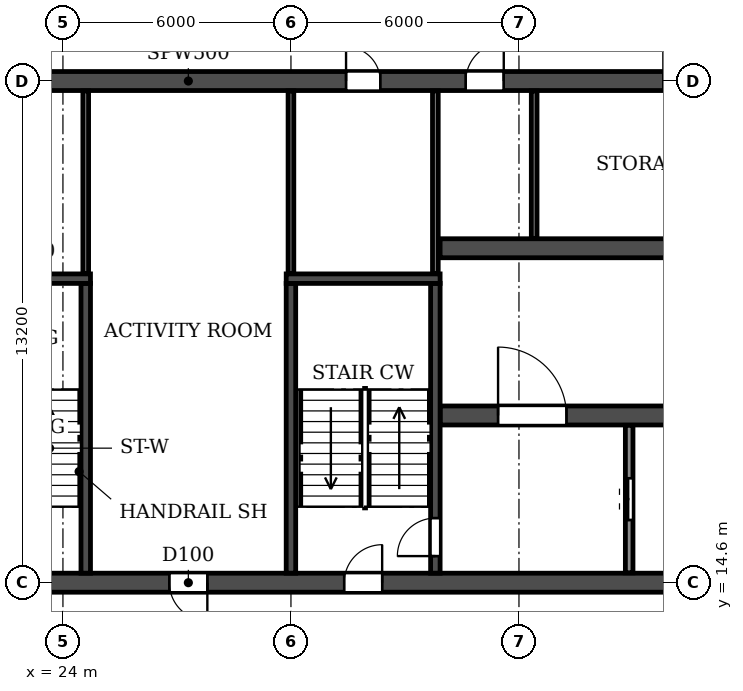
"""IFC4 building model, lengths in metres.
Left out: names, types, materials, properties, quantities, classifications, styles, units other than length and angle.
Written with IfcOpenShell. Run it as: python <this file> out.ifc"""

import sys

from ifc_helpers import new_model, si_unit, direction, frame, frame_2d, origin, place, context, subcontext, project, spatial, rectangle, extrude, element, fill, save


model = new_model("IFC4")
c1 = context("Model", 3, precision=1e-05, world=origin(), true_north=direction((0.0, 1.0)))
c2 = subcontext(c1, "Body", "Model", "MODEL_VIEW")
j1 = project(units=[si_unit("LENGTHUNIT", "METRE"), si_unit("PLANEANGLEUNIT", "RADIAN")], contexts=[c1])
p1 = place(None, origin())
s1 = spatial("IfcSite", under=j1, at=p1, CompositionType="ELEMENT")
p2 = place(p1, origin())
s2 = spatial("IfcBuilding", under=s1, at=p2, CompositionType="ELEMENT")
p3 = place(p2, frame((0.0, 0.0, 92.7)))
s3 = spatial("IfcBuildingStorey", under=s2, at=p3, CompositionType="ELEMENT", Elevation=92.7)
p4 = place(p3, frame((8.6, 14.6, 0.0), z_axis=(0.0, 0.0, 1.0), x_axis=(1.0, 0.0, 0.0)))
e1 = element("IfcWall", 1, at=p4, inside=s3, PredefinedType="SOLIDWALL", context=c2, shape_type="SweptSolid", body=[
    extrude(rectangle(XDim=84.8, YDim=0.5, at=frame_2d((42.4, 0.0))), origin(), (0.0, 0.0, 1.0), 3.06),
])
p5 = place(p4, frame((4.2, 0.0, 0.0)))
e2 = element("IfcOpeningElement", 2, at=p5, cuts=e1, PredefinedType="OPENING", context=c2, shape_type="SweptSolid", body=[
    extrude(rectangle(XDim=1.0, YDim=2.1, at=frame_2d((0.5, 1.05))), frame((0.0, 0.26, 0.0), z_axis=(0.0, -1.0, 0.0), x_axis=(1.0, 0.0, 0.0)), (0.0, 0.0, 1.0), 0.52),
])
p6 = place(p4, frame((10.3, 0.0, 0.0)))
e3 = element("IfcOpeningElement", 3, at=p6, cuts=e1, PredefinedType="OPENING", context=c2, shape_type="SweptSolid", body=[
    extrude(rectangle(XDim=1.0, YDim=2.1, at=frame_2d((0.5, 1.05))), frame((0.0, 0.26, 0.0), z_axis=(0.0, -1.0, 0.0), x_axis=(1.0, 0.0, 0.0)), (0.0, 0.0, 1.0), 0.52),
])
p7 = place(p4, frame((18.2, 0.0, 0.0)))
e4 = element("IfcOpeningElement", 4, at=p7, cuts=e1, PredefinedType="OPENING", context=c2, shape_type="SweptSolid", body=[
    extrude(rectangle(XDim=1.0, YDim=2.1, at=frame_2d((0.5, 1.05))), frame((0.0, 0.26, 0.0), z_axis=(0.0, -1.0, 0.0), x_axis=(1.0, 0.0, 0.0)), (0.0, 0.0, 1.0), 0.52),
])
p8 = place(p4, frame((22.8, 0.0, 0.0)))
e5 = element("IfcOpeningElement", 5, at=p8, cuts=e1, PredefinedType="OPENING", context=c2, shape_type="SweptSolid", body=[
    extrude(rectangle(XDim=1.0, YDim=2.1, at=frame_2d((0.5, 1.05))), frame((0.0, 0.26, 0.0), z_axis=(0.0, -1.0, 0.0), x_axis=(1.0, 0.0, 0.0)), (0.0, 0.0, 1.0), 0.52),
])
p9 = place(p4, frame((34.1, 0.0, 0.0)))
e6 = element("IfcOpeningElement", 6, at=p9, cuts=e1, PredefinedType="OPENING", context=c2, shape_type="SweptSolid", body=[
    extrude(rectangle(XDim=1.0, YDim=2.1, at=frame_2d((0.5, 1.05))), frame((0.0, 0.26, 0.0), z_axis=(0.0, -1.0, 0.0), x_axis=(1.0, 0.0, 0.0)), (0.0, 0.0, 1.0), 0.52),
])
p10 = place(p4, frame((38.0, 0.0, 0.0)))
e7 = element("IfcOpeningElement", 7, at=p10, cuts=e1, PredefinedType="OPENING", context=c2, shape_type="SweptSolid", body=[
    extrude(rectangle(XDim=1.0, YDim=2.1, at=frame_2d((0.5, 1.05))), frame((0.0, 0.26, 0.0), z_axis=(0.0, -1.0, 0.0), x_axis=(1.0, 0.0, 0.0)), (0.0, 0.0, 1.0), 0.52),
])
p11 = place(p4, frame((41.9, 0.0, 0.0)))
e8 = element("IfcOpeningElement", 8, at=p11, cuts=e1, PredefinedType="OPENING", context=c2, shape_type="SweptSolid", body=[
    extrude(rectangle(XDim=1.0, YDim=2.1, at=frame_2d((0.5, 1.05))), frame((0.0, 0.26, 0.0), z_axis=(0.0, -1.0, 0.0), x_axis=(1.0, 0.0, 0.0)), (0.0, 0.0, 1.0), 0.52),
])
p12 = place(p4, frame((47.1, 0.0, 0.0)))
e9 = element("IfcOpeningElement", 9, at=p12, cuts=e1, PredefinedType="OPENING", context=c2, shape_type="SweptSolid", body=[
    extrude(rectangle(XDim=1.0, YDim=2.1, at=frame_2d((0.5, 1.05))), frame((0.0, 0.26, 0.0), z_axis=(0.0, -1.0, 0.0), x_axis=(1.0, 0.0, 0.0)), (0.0, 0.0, 1.0), 0.52),
])
p13 = place(p4, frame((61.0, 0.0, 0.0)))
e10 = element("IfcOpeningElement", 10, at=p13, cuts=e1, PredefinedType="OPENING", context=c2, shape_type="SweptSolid", body=[
    extrude(rectangle(XDim=1.0, YDim=2.1, at=frame_2d((0.5, 1.05))), frame((0.0, 0.26, 0.0), z_axis=(0.0, -1.0, 0.0), x_axis=(1.0, 0.0, 0.0)), (0.0, 0.0, 1.0), 0.52),
])
p14 = place(p4, frame((65.6, 0.0, 0.0)))
e11 = element("IfcOpeningElement", 11, at=p14, cuts=e1, PredefinedType="OPENING", context=c2, shape_type="SweptSolid", body=[
    extrude(rectangle(XDim=1.0, YDim=2.1, at=frame_2d((0.5, 1.05))), frame((0.0, 0.26, 0.0), z_axis=(0.0, -1.0, 0.0), x_axis=(1.0, 0.0, 0.0)), (0.0, 0.0, 1.0), 0.52),
])
p15 = place(p4, frame((73.5, 0.0, 0.0)))
e12 = element("IfcOpeningElement", 12, at=p15, cuts=e1, PredefinedType="OPENING", context=c2, shape_type="SweptSolid", body=[
    extrude(rectangle(XDim=1.0, YDim=2.1, at=frame_2d((0.5, 1.05))), frame((0.0, 0.26, 0.0), z_axis=(0.0, -1.0, 0.0), x_axis=(1.0, 0.0, 0.0)), (0.0, 0.0, 1.0), 0.52),
])
p16 = place(p4, frame((76.25, 0.0, 0.0)))
e13 = element("IfcOpeningElement", 13, at=p16, cuts=e1, PredefinedType="OPENING", context=c2, shape_type="SweptSolid", body=[
    extrude(rectangle(XDim=1.0, YDim=2.1, at=frame_2d((0.5, 1.05))), frame((0.0, 0.26, 0.0), z_axis=(0.0, -1.0, 0.0), x_axis=(1.0, 0.0, 0.0)), (0.0, 0.0, 1.0), 0.52),
])
p17 = place(p4, frame((80.95, 0.0, 0.0)))
e14 = element("IfcOpeningElement", 14, at=p17, cuts=e1, PredefinedType="OPENING", context=c2, shape_type="SweptSolid", body=[
    extrude(rectangle(XDim=1.0, YDim=2.1, at=frame_2d((0.5, 1.05))), frame((0.0, 0.26, 0.0), z_axis=(0.0, -1.0, 0.0), x_axis=(1.0, 0.0, 0.0)), (0.0, 0.0, 1.0), 0.52),
])
p18 = place(p3, frame((8.6, 27.8, 0.0), z_axis=(0.0, 0.0, 1.0), x_axis=(1.0, 0.0, 0.0)))
e15 = element("IfcWall", 15, at=p18, inside=s3, PredefinedType="SOLIDWALL", context=c2, shape_type="SweptSolid", body=[
    extrude(rectangle(XDim=84.8, YDim=0.5, at=frame_2d((42.4, 0.0))), origin(), (0.0, 0.0, 1.0), 3.06),
])
p19 = place(p18, frame((0.9, 0.0, 0.0)))
e16 = element("IfcOpeningElement", 16, at=p19, cuts=e15, PredefinedType="OPENING", context=c2, shape_type="SweptSolid", body=[
    extrude(rectangle(XDim=1.0, YDim=2.1, at=frame_2d((0.5, 1.05))), frame((0.0, 0.26, 0.0), z_axis=(0.0, -1.0, 0.0), x_axis=(1.0, 0.0, 0.0)), (0.0, 0.0, 1.0), 0.52),
])
p20 = place(p18, frame((5.6, 0.0, 0.0)))
e17 = element("IfcOpeningElement", 17, at=p20, cuts=e15, PredefinedType="OPENING", context=c2, shape_type="SweptSolid", body=[
    extrude(rectangle(XDim=1.0, YDim=2.1, at=frame_2d((0.5, 1.05))), frame((0.0, 0.26, 0.0), z_axis=(0.0, -1.0, 0.0), x_axis=(1.0, 0.0, 0.0)), (0.0, 0.0, 1.0), 0.52),
])
p21 = place(p18, frame((10.3, 0.0, 0.0)))
e18 = element("IfcOpeningElement", 18, at=p21, cuts=e15, PredefinedType="OPENING", context=c2, shape_type="SweptSolid", body=[
    extrude(rectangle(XDim=1.0, YDim=2.1, at=frame_2d((0.5, 1.05))), frame((0.0, 0.26, 0.0), z_axis=(0.0, -1.0, 0.0), x_axis=(1.0, 0.0, 0.0)), (0.0, 0.0, 1.0), 0.52),
])
p22 = place(p18, frame((13.65, 0.0, 0.0)))
e19 = element("IfcOpeningElement", 19, at=p22, cuts=e15, PredefinedType="OPENING", context=c2, shape_type="SweptSolid", body=[
    extrude(rectangle(XDim=0.9, YDim=2.1, at=frame_2d((0.45, 1.05))), frame((0.0, 0.26, 0.0), z_axis=(0.0, -1.0, 0.0), x_axis=(1.0, 0.0, 0.0)), (0.0, 0.0, 1.0), 0.52),
])
p23 = place(p18, frame((22.85, 0.0, 0.0)))
e20 = element("IfcOpeningElement", 20, at=p23, cuts=e15, PredefinedType="OPENING", context=c2, shape_type="SweptSolid", body=[
    extrude(rectangle(XDim=0.9, YDim=2.1, at=frame_2d((0.45, 1.05))), frame((0.0, 0.26, 0.0), z_axis=(0.0, -1.0, 0.0), x_axis=(1.0, 0.0, 0.0)), (0.0, 0.0, 1.0), 0.52),
])
p24 = place(p18, frame((26.0, 0.0, 0.0)))
e21 = element("IfcOpeningElement", 21, at=p24, cuts=e15, PredefinedType="OPENING", context=c2, shape_type="SweptSolid", body=[
    extrude(rectangle(XDim=1.0, YDim=2.1, at=frame_2d((0.5, 1.05))), frame((0.0, 0.26, 0.0), z_axis=(0.0, -1.0, 0.0), x_axis=(1.0, 0.0, 0.0)), (0.0, 0.0, 1.0), 0.52),
])
p25 = place(p18, frame((31.2, 0.0, 0.0)))
e22 = element("IfcOpeningElement", 22, at=p25, cuts=e15, PredefinedType="OPENING", context=c2, shape_type="SweptSolid", body=[
    extrude(rectangle(XDim=1.0, YDim=2.1, at=frame_2d((0.5, 1.05))), frame((0.0, 0.26, 0.0), z_axis=(0.0, -1.0, 0.0), x_axis=(1.0, 0.0, 0.0)), (0.0, 0.0, 1.0), 0.52),
])
p26 = place(p18, frame((39.0, 0.0, 0.0)))
e23 = element("IfcOpeningElement", 23, at=p26, cuts=e15, PredefinedType="OPENING", context=c2, shape_type="SweptSolid", body=[
    extrude(rectangle(XDim=1.0, YDim=2.1, at=frame_2d((0.5, 1.05))), frame((0.0, 0.26, 0.0), z_axis=(0.0, -1.0, 0.0), x_axis=(1.0, 0.0, 0.0)), (0.0, 0.0, 1.0), 0.52),
])
p27 = place(p18, frame((41.9, 0.0, 0.0)))
e24 = element("IfcOpeningElement", 24, at=p27, cuts=e15, PredefinedType="OPENING", context=c2, shape_type="SweptSolid", body=[
    extrude(rectangle(XDim=1.0, YDim=2.1, at=frame_2d((0.5, 1.05))), frame((0.0, 0.26, 0.0), z_axis=(0.0, -1.0, 0.0), x_axis=(1.0, 0.0, 0.0)), (0.0, 0.0, 1.0), 0.52),
])
p28 = place(p18, frame((46.1, 0.0, 0.0)))
e25 = element("IfcOpeningElement", 25, at=p28, cuts=e15, PredefinedType="OPENING", context=c2, shape_type="SweptSolid", body=[
    extrude(rectangle(XDim=1.0, YDim=2.1, at=frame_2d((0.5, 1.05))), frame((0.0, 0.26, 0.0), z_axis=(0.0, -1.0, 0.0), x_axis=(1.0, 0.0, 0.0)), (0.0, 0.0, 1.0), 0.52),
])
p29 = place(p18, frame((50.0, 0.0, 0.0)))
e26 = element("IfcOpeningElement", 26, at=p29, cuts=e15, PredefinedType="OPENING", context=c2, shape_type="SweptSolid", body=[
    extrude(rectangle(XDim=1.0, YDim=2.1, at=frame_2d((0.5, 1.05))), frame((0.0, 0.26, 0.0), z_axis=(0.0, -1.0, 0.0), x_axis=(1.0, 0.0, 0.0)), (0.0, 0.0, 1.0), 0.52),
])
p30 = place(p18, frame((52.6, 0.0, 0.0)))
e27 = element("IfcOpeningElement", 27, at=p30, cuts=e15, PredefinedType="OPENING", context=c2, shape_type="SweptSolid", body=[
    extrude(rectangle(XDim=1.0, YDim=2.1, at=frame_2d((0.5, 1.05))), frame((0.0, 0.26, 0.0), z_axis=(0.0, -1.0, 0.0), x_axis=(1.0, 0.0, 0.0)), (0.0, 0.0, 1.0), 0.52),
])
p31 = place(p18, frame((56.25, 0.0, 0.0)))
e28 = element("IfcOpeningElement", 28, at=p31, cuts=e15, PredefinedType="OPENING", context=c2, shape_type="SweptSolid", body=[
    extrude(rectangle(XDim=1.5, YDim=2.1, at=frame_2d((0.75, 1.05))), frame((0.0, 0.26, 0.0), z_axis=(0.0, -1.0, 0.0), x_axis=(1.0, 0.0, 0.0)), (0.0, 0.0, 1.0), 0.52),
])
p32 = place(p18, frame((61.05, 0.0, 0.0)))
e29 = element("IfcOpeningElement", 29, at=p32, cuts=e15, PredefinedType="OPENING", context=c2, shape_type="SweptSolid", body=[
    extrude(rectangle(XDim=0.9, YDim=2.1, at=frame_2d((0.45, 1.05))), frame((0.0, 0.26, 0.0), z_axis=(0.0, -1.0, 0.0), x_axis=(1.0, 0.0, 0.0)), (0.0, 0.0, 1.0), 0.52),
])
p33 = place(p18, frame((70.25, 0.0, 0.0)))
e30 = element("IfcOpeningElement", 30, at=p33, cuts=e15, PredefinedType="OPENING", context=c2, shape_type="SweptSolid", body=[
    extrude(rectangle(XDim=0.9, YDim=2.1, at=frame_2d((0.45, 1.05))), frame((0.0, 0.26, 0.0), z_axis=(0.0, -1.0, 0.0), x_axis=(1.0, 0.0, 0.0)), (0.0, 0.0, 1.0), 0.52),
])
p34 = place(p18, frame((73.5, 0.0, 0.0)))
e31 = element("IfcOpeningElement", 31, at=p34, cuts=e15, PredefinedType="OPENING", context=c2, shape_type="SweptSolid", body=[
    extrude(rectangle(XDim=1.0, YDim=2.1, at=frame_2d((0.5, 1.05))), frame((0.0, 0.26, 0.0), z_axis=(0.0, -1.0, 0.0), x_axis=(1.0, 0.0, 0.0)), (0.0, 0.0, 1.0), 0.52),
])
p35 = place(p18, frame((79.6, 0.0, 0.0)))
e32 = element("IfcOpeningElement", 32, at=p35, cuts=e15, PredefinedType="OPENING", context=c2, shape_type="SweptSolid", body=[
    extrude(rectangle(XDim=1.0, YDim=2.1, at=frame_2d((0.5, 1.05))), frame((0.0, 0.26, 0.0), z_axis=(0.0, -1.0, 0.0), x_axis=(1.0, 0.0, 0.0)), (0.0, 0.0, 1.0), 0.52),
])
p36 = place(p3, frame((33.925, 19.0, 0.0), z_axis=(0.0, 0.0, 1.0), x_axis=(1.0, 0.0, 0.0)))
e33 = element("IfcWall", 33, at=p36, inside=s3, PredefinedType="SOLIDWALL", context=c2, shape_type="SweptSolid", body=[
    extrude(rectangle(XDim=34.15, YDim=0.5, at=frame_2d((17.075, 0.0))), origin(), (0.0, 0.0, 1.0), 3.06),
])
p37 = place(p36, frame((16.175, 0.0, 0.0)))
e34 = element("IfcOpeningElement", 34, at=p37, cuts=e33, PredefinedType="OPENING", context=c2, shape_type="SweptSolid", body=[
    extrude(rectangle(XDim=1.8, YDim=2.1, at=frame_2d((0.9, 1.05))), frame((0.0, 0.26, 0.0), z_axis=(0.0, -1.0, 0.0), x_axis=(1.0, 0.0, 0.0)), (0.0, 0.0, 1.0), 0.52),
])
p38 = place(p36, frame((1.525, 0.0, 0.0)))
e35 = element("IfcOpeningElement", 35, at=p38, cuts=e33, PredefinedType="OPENING", context=c2, shape_type="SweptSolid", body=[
    extrude(rectangle(XDim=1.8, YDim=2.1, at=frame_2d((0.9, 1.05))), frame((0.0, 0.26, 0.0), z_axis=(0.0, -1.0, 0.0), x_axis=(1.0, 0.0, 0.0)), (0.0, 0.0, 1.0), 0.52),
])
p39 = place(p36, frame((8.725, 0.0, 0.0)))
e36 = element("IfcOpeningElement", 36, at=p39, cuts=e33, PredefinedType="OPENING", context=c2, shape_type="SweptSolid", body=[
    extrude(rectangle(XDim=1.1, YDim=2.1, at=frame_2d((0.55, 1.05))), frame((0.0, 0.26, 0.0), z_axis=(0.0, -1.0, 0.0), x_axis=(1.0, 0.0, 0.0)), (0.0, 0.0, 1.0), 0.52),
])
p40 = place(p36, frame((11.325, 0.0, 0.0)))
e37 = element("IfcOpeningElement", 37, at=p40, cuts=e33, PredefinedType="OPENING", context=c2, shape_type="SweptSolid", body=[
    extrude(rectangle(XDim=1.1, YDim=2.1, at=frame_2d((0.55, 1.05))), frame((0.0, 0.26, 0.0), z_axis=(0.0, -1.0, 0.0), x_axis=(1.0, 0.0, 0.0)), (0.0, 0.0, 1.0), 0.52),
])
p41 = place(p36, frame((13.925, 0.0, 0.0)))
e38 = element("IfcOpeningElement", 38, at=p41, cuts=e33, PredefinedType="OPENING", context=c2, shape_type="SweptSolid", body=[
    extrude(rectangle(XDim=1.1, YDim=2.1, at=frame_2d((0.55, 1.05))), frame((0.0, 0.26, 0.0), z_axis=(0.0, -1.0, 0.0), x_axis=(1.0, 0.0, 0.0)), (0.0, 0.0, 1.0), 0.52),
])
p42 = place(p36, frame((19.125, 0.0, 0.0)))
e39 = element("IfcOpeningElement", 39, at=p42, cuts=e33, PredefinedType="OPENING", context=c2, shape_type="SweptSolid", body=[
    extrude(rectangle(XDim=1.1, YDim=2.1, at=frame_2d((0.55, 1.05))), frame((0.0, 0.26, 0.0), z_axis=(0.0, -1.0, 0.0), x_axis=(1.0, 0.0, 0.0)), (0.0, 0.0, 1.0), 0.52),
])
p43 = place(p36, frame((21.725, 0.0, 0.0)))
e40 = element("IfcOpeningElement", 40, at=p43, cuts=e33, PredefinedType="OPENING", context=c2, shape_type="SweptSolid", body=[
    extrude(rectangle(XDim=1.1, YDim=2.1, at=frame_2d((0.55, 1.05))), frame((0.0, 0.26, 0.0), z_axis=(0.0, -1.0, 0.0), x_axis=(1.0, 0.0, 0.0)), (0.0, 0.0, 1.0), 0.52),
])
p44 = place(p36, frame((24.325, 0.0, 0.0)))
e41 = element("IfcOpeningElement", 41, at=p44, cuts=e33, PredefinedType="OPENING", context=c2, shape_type="SweptSolid", body=[
    extrude(rectangle(XDim=1.1, YDim=2.1, at=frame_2d((0.55, 1.05))), frame((0.0, 0.26, 0.0), z_axis=(0.0, -1.0, 0.0), x_axis=(1.0, 0.0, 0.0)), (0.0, 0.0, 1.0), 0.52),
])
p45 = place(p36, frame((30.825, 0.0, 0.0)))
e42 = element("IfcOpeningElement", 42, at=p45, cuts=e33, PredefinedType="OPENING", context=c2, shape_type="SweptSolid", body=[
    extrude(rectangle(XDim=1.8, YDim=2.1, at=frame_2d((0.9, 1.05))), frame((0.0, 0.26, 0.0), z_axis=(0.0, -1.0, 0.0), x_axis=(1.0, 0.0, 0.0)), (0.0, 0.0, 1.0), 0.52),
])
p46 = place(p3, frame((33.925, 23.4, 0.0), z_axis=(0.0, 0.0, 1.0), x_axis=(1.0, 0.0, 0.0)))
e43 = element("IfcWall", 43, at=p46, inside=s3, PredefinedType="SOLIDWALL", context=c2, shape_type="SweptSolid", body=[
    extrude(rectangle(XDim=34.15, YDim=0.5, at=frame_2d((17.075, 0.0))), origin(), (0.0, 0.0, 1.0), 3.06),
])
p47 = place(p46, frame((16.175, 0.0, 0.0)))
e44 = element("IfcOpeningElement", 44, at=p47, cuts=e43, PredefinedType="OPENING", context=c2, shape_type="SweptSolid", body=[
    extrude(rectangle(XDim=1.8, YDim=2.1, at=frame_2d((0.9, 1.05))), frame((0.0, 0.26, 0.0), z_axis=(0.0, -1.0, 0.0), x_axis=(1.0, 0.0, 0.0)), (0.0, 0.0, 1.0), 0.52),
])
p48 = place(p46, frame((11.025, 0.0, 0.0)))
e45 = element("IfcOpeningElement", 45, at=p48, cuts=e43, PredefinedType="OPENING", context=c2, shape_type="SweptSolid", body=[
    extrude(rectangle(XDim=1.1, YDim=2.1, at=frame_2d((0.55, 1.05))), frame((0.0, 0.26, 0.0), z_axis=(0.0, -1.0, 0.0), x_axis=(1.0, 0.0, 0.0)), (0.0, 0.0, 1.0), 0.52),
])
p49 = place(p3, frame((30.0, 14.85, 0.0), z_axis=(0.0, 0.0, 1.0), x_axis=(0.0, 1.0, 0.0)))
e46 = element("IfcWall", 46, at=p49, inside=s3, PredefinedType="SOLIDWALL", context=c2, shape_type="SweptSolid", body=[
    extrude(rectangle(XDim=7.625, YDim=0.25, at=frame_2d((3.812, 0.0))), origin(), (0.0, 0.0, 1.0), 3.06),
])
p50 = place(p3, frame((33.8, 14.85, 0.0), z_axis=(0.0, 0.0, 1.0), x_axis=(0.0, 1.0, 0.0)))
e47 = element("IfcWall", 47, at=p50, inside=s3, PredefinedType="SOLIDWALL", context=c2, shape_type="SweptSolid", body=[
    extrude(rectangle(XDim=7.625, YDim=0.25, at=frame_2d((3.812, 0.0))), origin(), (0.0, 0.0, 1.0), 3.06),
])
p51 = place(p50, frame((0.45, 0.0, 0.0)))
e48 = element("IfcOpeningElement", 48, at=p51, cuts=e47, PredefinedType="OPENING", context=c2, shape_type="SweptSolid", body=[
    extrude(rectangle(XDim=1.0, YDim=2.1, at=frame_2d((0.5, 1.05))), frame((0.0, 0.135, 0.0), z_axis=(0.0, -1.0, 0.0), x_axis=(1.0, 0.0, 0.0)), (0.0, 0.0, 1.0), 0.27),
])
p52 = place(p3, frame((29.875, 22.6, 0.0), z_axis=(0.0, 0.0, 1.0), x_axis=(1.0, 0.0, 0.0)))
e49 = element("IfcWall", 49, at=p52, inside=s3, PredefinedType="SOLIDWALL", context=c2, shape_type="SweptSolid", body=[
    extrude(rectangle(XDim=4.05, YDim=0.25, at=frame_2d((2.025, 0.0))), origin(), (0.0, 0.0, 1.0), 3.06),
])
p53 = place(p3, frame((24.6, 14.85, 0.0), z_axis=(0.0, 0.0, 1.0), x_axis=(0.0, 1.0, 0.0)))
e50 = element("IfcWall", 50, at=p53, inside=s3, PredefinedType="SOLIDWALL", context=c2, shape_type="SweptSolid", body=[
    extrude(rectangle(XDim=7.625, YDim=0.25, at=frame_2d((3.812, 0.0))), origin(), (0.0, 0.0, 1.0), 3.06),
])
p54 = place(p3, frame((20.675, 22.6, 0.0), z_axis=(0.0, 0.0, 1.0), x_axis=(1.0, 0.0, 0.0)))
e51 = element("IfcWall", 51, at=p54, inside=s3, PredefinedType="SOLIDWALL", context=c2, shape_type="SweptSolid", body=[
    extrude(rectangle(XDim=4.05, YDim=0.25, at=frame_2d((2.025, 0.0))), origin(), (0.0, 0.0, 1.0), 3.06),
])
p55 = place(p3, frame((36.4, 23.66, 0.0), z_axis=(0.0, 0.0, 1.0), x_axis=(0.0, 1.0, 0.0)))
e52 = element("IfcWall", 52, at=p55, inside=s3, PredefinedType="PARTITIONING", context=c2, shape_type="SweptSolid", body=[
    extrude(rectangle(XDim=3.88, YDim=0.15, at=frame_2d((1.94, 0.0))), origin(), (0.0, 0.0, 1.0), 3.06),
])
for number, where, z_axis, x_axis in (
    (53, (24.6, 22.735, 0.0), (0.0, 0.0, 1.0), (0.0, 1.0, 0.0)),
    (54, (30.0, 22.735, 0.0), (0.0, 0.0, 1.0), (0.0, 1.0, 0.0)),
    (55, (33.8, 22.735, 0.0), (0.0, 0.0, 1.0), (0.0, 1.0, 0.0)),
):
    element("IfcWall", number, at=place(p3, frame(where, z_axis=z_axis, x_axis=x_axis)), inside=s3, PredefinedType="PARTITIONING", context=c2, shape_type="SweptSolid", body=[
        extrude(rectangle(XDim=4.805, YDim=0.15, at=frame_2d((2.402, 0.0))), origin(), (0.0, 0.0, 1.0), 3.06),
    ])
p56 = place(p3, frame((38.9, 14.86, 0.0), z_axis=(0.0, 0.0, 1.0), x_axis=(0.0, 1.0, 0.0)))
e56 = element("IfcWall", 56, at=p56, inside=s3, PredefinedType="PARTITIONING", context=c2, shape_type="SweptSolid", body=[
    extrude(rectangle(XDim=3.88, YDim=0.2, at=frame_2d((1.94, 0.0))), origin(), (0.0, 0.0, 1.0), 3.06),
])
p57 = place(p56, frame((1.39, 0.0, 0.0)))
e57 = element("IfcOpeningElement", 57, at=p57, cuts=e56, PredefinedType="OPENING", context=c2, shape_type="SweptSolid", body=[
    extrude(rectangle(XDim=1.1, YDim=2.1, at=frame_2d((0.55, 1.05))), frame((0.0, 0.11, 0.0), z_axis=(0.0, -1.0, 0.0), x_axis=(1.0, 0.0, 0.0)), (0.0, 0.0, 1.0), 0.22),
])
p58 = place(p23, origin())
e58 = element("IfcDoor", 58, at=p58, inside=s3, OperationType="SINGLE_SWING_LEFT", PredefinedType="DOOR", context=c2, shape_type="SweptSolid", body=[
    extrude(rectangle(XDim=0.9, YDim=2.1, at=frame_2d((0.45, 1.05))), frame((0.0, 0.025, 0.0), z_axis=(0.0, -1.0, 0.0), x_axis=(1.0, 0.0, 0.0)), (0.0, 0.0, 1.0), 0.05),
])
fill(e20, e58)
p59 = place(p24, origin())
e59 = element("IfcDoor", 59, at=p59, inside=s3, OperationType="SINGLE_SWING_RIGHT", PredefinedType="DOOR", context=c2, shape_type="SweptSolid", body=[
    extrude(rectangle(XDim=1.0, YDim=2.1, at=frame_2d((0.5, 1.05))), frame((0.0, 0.025, 0.0), z_axis=(0.0, -1.0, 0.0), x_axis=(1.0, 0.0, 0.0)), (0.0, 0.0, 1.0), 0.05),
])
fill(e21, e59)
p60 = place(p7, frame((1.0, 0.0, 0.0), z_axis=(0.0, 0.0, 1.0), x_axis=(-1.0, 0.0, 0.0)))
e60 = element("IfcDoor", 60, at=p60, inside=s3, OperationType="SINGLE_SWING_LEFT", PredefinedType="DOOR", context=c2, shape_type="SweptSolid", body=[
    extrude(rectangle(XDim=1.0, YDim=2.1, at=frame_2d((0.5, 1.05))), frame((0.0, 0.025, 0.0), z_axis=(0.0, -1.0, 0.0), x_axis=(1.0, 0.0, 0.0)), (0.0, 0.0, 1.0), 0.05),
])
fill(e4, e60)
p61 = place(p8, origin())
e61 = element("IfcDoor", 61, at=p61, inside=s3, OperationType="SINGLE_SWING_RIGHT", PredefinedType="DOOR", context=c2, shape_type="SweptSolid", body=[
    extrude(rectangle(XDim=1.0, YDim=2.1, at=frame_2d((0.5, 1.05))), frame((0.0, 0.025, 0.0), z_axis=(0.0, -1.0, 0.0), x_axis=(1.0, 0.0, 0.0)), (0.0, 0.0, 1.0), 0.05),
])
fill(e5, e61)
p62 = place(p51, origin())
e62 = element("IfcDoor", 62, at=p62, inside=s3, OperationType="SINGLE_SWING_LEFT", PredefinedType="DOOR", context=c2, shape_type="SweptSolid", body=[
    extrude(rectangle(XDim=1.0, YDim=2.1, at=frame_2d((0.5, 1.05))), frame((0.0, 0.025, 0.0), z_axis=(0.0, -1.0, 0.0), x_axis=(1.0, 0.0, 0.0)), (0.0, 0.0, 1.0), 0.05),
])
fill(e48, e62)
p63 = place(p57, origin())
e63 = element("IfcDoor", 63, at=p63, inside=s3, OperationType="DOUBLE_DOOR_SLIDING", PredefinedType="DOOR", context=c2, shape_type="SweptSolid", body=[
    extrude(rectangle(XDim=1.1, YDim=2.1, at=frame_2d((0.55, 1.05))), frame((0.0, 0.025, 0.0), z_axis=(0.0, -1.0, 0.0), x_axis=(1.0, 0.0, 0.0)), (0.0, 0.0, 1.0), 0.05),
])
fill(e57, e63)
p64 = place(p38, origin())
e64 = element("IfcDoor", 64, at=p64, inside=s3, OperationType="DOUBLE_DOOR_SINGLE_SWING", PredefinedType="DOOR", context=c2, shape_type="SweptSolid", body=[
    extrude(rectangle(XDim=1.8, YDim=2.1, at=frame_2d((0.9, 1.05))), frame((0.0, 0.025, 0.0), z_axis=(0.0, -1.0, 0.0), x_axis=(1.0, 0.0, 0.0)), (0.0, 0.0, 1.0), 0.05),
])
fill(e35, e64)
save(model, sys.argv[1])
